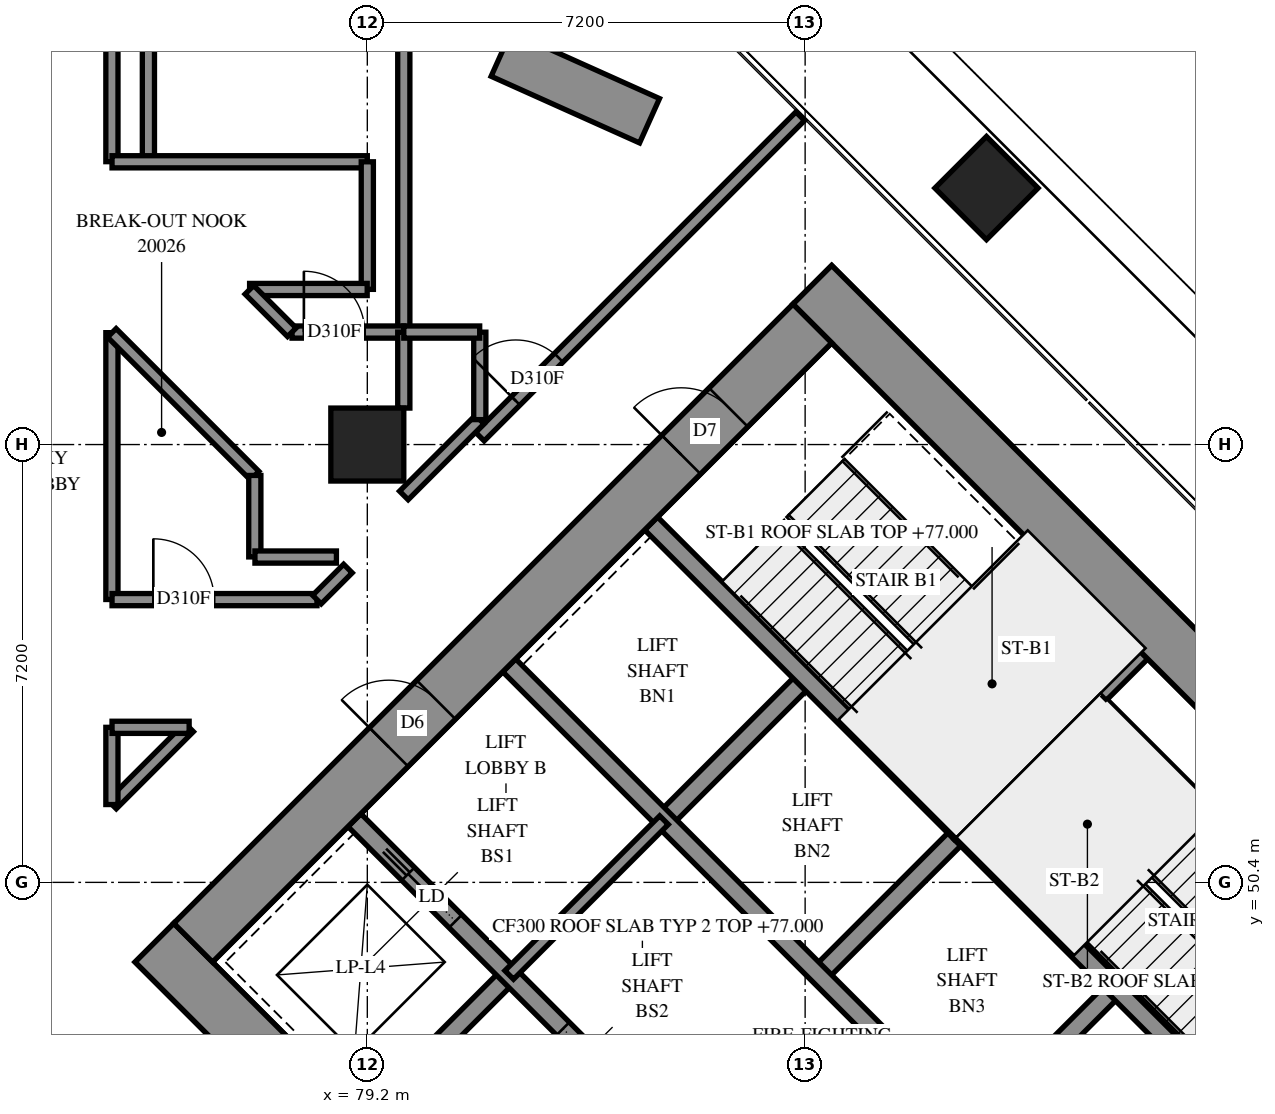
"""IFC4 building model, lengths in metres.
Left out: names, types, materials, properties, quantities, classifications, styles, units other than length and angle.
Written with IfcOpenShell. Run it as: python <this file> out.ifc"""

import sys

from ifc_helpers import new_model, si_unit, direction, frame, frame_2d, origin, origin_2d, place, context, subcontext, project, spatial, rectangle, extrude, element, fill, save


model = new_model("IFC4")
c1 = context("Model", 3, precision=1e-05, world=origin(), true_north=direction((0.0, 1.0)))
c2 = subcontext(c1, "Body", "Model", "MODEL_VIEW")
j1 = project(units=[si_unit("LENGTHUNIT", "METRE"), si_unit("PLANEANGLEUNIT", "RADIAN")], contexts=[c1])
p1 = place(None, origin())
s1 = spatial("IfcSite", under=j1, at=p1, CompositionType="ELEMENT")
p2 = place(p1, origin())
s2 = spatial("IfcBuilding", under=s1, at=p2, CompositionType="ELEMENT")
p3 = place(p2, frame((0.0, 0.0, 77.0)))
s3 = spatial("IfcBuildingStorey", under=s2, at=p3, CompositionType="ELEMENT", Elevation=77.0)
for number, where, z_axis, x_axis in (
    (1, (79.2, 57.6, 0.0), (0.0, 0.0, 1.0), (1.0, 0.0, 0.0)),
    (2, (89.382, 61.818, 0.0), (0.0, 0.0, 1.0), (0.707, -0.707, 0.0)),
):
    element("IfcColumn", number, at=place(p3, frame(where, z_axis=z_axis, x_axis=x_axis)), inside=s3, PredefinedType="COLUMN", context=c2, shape_type="SweptSolid", body=[
        extrude(rectangle(XDim=1.2, YDim=1.2, at=origin_2d()), origin(), (0.0, 0.0, 1.0), 3.9),
    ])
p4 = place(p3, frame((75.7, 49.408, -0.3), z_axis=(0.0, 0.0, 1.0), x_axis=(0.7071098676, -0.7071036948, 0.0)))
e3 = element("IfcWall", 3, at=p4, inside=s3, PredefinedType="SHEAR", context=c2, shape_type="SweptSolid", body=[
    extrude(rectangle(XDim=16.2, YDim=0.9, at=frame_2d((8.1, 0.0))), origin(), (0.0, 0.0, 1.0), 3.5),
])
p5 = place(p3, frame((86.519, 60.227, -0.3), z_axis=(0.0, 0.0, 1.0), x_axis=(0.7071036948, -0.7071098676, 0.0)))
e4 = element("IfcWall", 4, at=p5, inside=s3, PredefinedType="SHEAR", context=c2, shape_type="SweptSolid", body=[
    extrude(rectangle(XDim=16.2, YDim=0.9, at=frame_2d((8.1, 0.0))), origin(), (0.0, 0.0, 1.0), 3.5),
])
p6 = place(p5, frame((10.9, 0.0, 0.3)))
e5 = element("IfcOpeningElement", 5, at=p6, cuts=e4, PredefinedType="OPENING", context=c2, shape_type="SweptSolid", body=[
    extrude(rectangle(XDim=0.8, YDim=2.1, at=frame_2d((0.4, 1.05))), frame((0.0, 0.46, 0.0), z_axis=(0.0, -1.0, 0.0), x_axis=(1.0, 0.0, 0.0)), (0.0, 0.0, 1.0), 0.92),
])
p7 = place(p3, frame((76.336, 49.408, -0.3), z_axis=(0.0, 0.0, 1.0), x_axis=(0.7071067812, 0.7071067812, 0.0)))
e6 = element("IfcWall", 6, at=p7, inside=s3, PredefinedType="SHEAR", context=c2, shape_type="SweptSolid", body=[
    extrude(rectangle(XDim=14.4, YDim=0.9, at=frame_2d((7.2, 0.0))), origin(), (0.0, 0.0, 1.0), 3.5),
])
p8 = place(p7, frame((4.55, 0.0, 0.3)))
e7 = element("IfcOpeningElement", 7, at=p8, cuts=e6, PredefinedType="OPENING", context=c2, shape_type="SweptSolid", body=[
    extrude(rectangle(XDim=1.1, YDim=2.1, at=frame_2d((0.55, 1.05))), frame((0.0, 0.46, 0.0), z_axis=(0.0, -1.0, 0.0), x_axis=(1.0, 0.0, 0.0)), (0.0, 0.0, 1.0), 0.92),
])
p9 = place(p7, frame((11.35, 0.0, 0.3)))
e8 = element("IfcOpeningElement", 8, at=p9, cuts=e6, PredefinedType="OPENING", context=c2, shape_type="SweptSolid", body=[
    extrude(rectangle(XDim=1.1, YDim=2.1, at=frame_2d((0.55, 1.05))), frame((0.0, 0.46, 0.0), z_axis=(0.0, -1.0, 0.0), x_axis=(1.0, 0.0, 0.0)), (0.0, 0.0, 1.0), 0.92),
])
p10 = place(p3, frame((87.155, 38.589, -0.3), z_axis=(0.0, 0.0, 1.0), x_axis=(0.7071067812, 0.7071067812, 0.0)))
e9 = element("IfcWall", 9, at=p10, inside=s3, PredefinedType="SHEAR", context=c2, shape_type="SweptSolid", body=[
    extrude(rectangle(XDim=14.4, YDim=0.9, at=frame_2d((7.2, 0.0))), origin(), (0.0, 0.0, 1.0), 3.5),
])
p11 = place(p10, frame((4.55, 0.0, 0.3)))
e10 = element("IfcOpeningElement", 10, at=p11, cuts=e9, PredefinedType="OPENING", context=c2, shape_type="SweptSolid", body=[
    extrude(rectangle(XDim=1.1, YDim=2.1, at=frame_2d((0.55, 1.05))), frame((0.0, 0.46, 0.0), z_axis=(0.0, -1.0, 0.0), x_axis=(1.0, 0.0, 0.0)), (0.0, 0.0, 1.0), 0.92),
])
p12 = place(p10, frame((11.35, 0.0, 0.3)))
e11 = element("IfcOpeningElement", 11, at=p12, cuts=e9, PredefinedType="OPENING", context=c2, shape_type="SweptSolid", body=[
    extrude(rectangle(XDim=1.1, YDim=2.1, at=frame_2d((0.55, 1.05))), frame((0.0, 0.46, 0.0), z_axis=(0.0, -1.0, 0.0), x_axis=(1.0, 0.0, 0.0)), (0.0, 0.0, 1.0), 0.92),
])
for number, where, z_axis, x_axis in (
    (12, (79.2, 46.544, 0.0), (0.0, 0.0, 1.0), (0.707, 0.707, 0.0)),
    (13, (84.079, 51.423, 0.0), (0.0, 0.0, 1.0), (0.707, 0.707, 0.0)),
):
    element("IfcWall", number, at=place(p3, frame(where, z_axis=z_axis, x_axis=x_axis)), inside=s3, PredefinedType="SOLIDWALL", context=c2, shape_type="SweptSolid", body=[
        extrude(rectangle(XDim=3.3, YDim=0.3, at=frame_2d((1.65, 0.0))), origin(), (0.0, 0.0, 1.0), 3.9),
    ])
for number, where, z_axis, x_axis in (
    (14, (86.625, 48.878, 0.0), (0.0, 0.0, 1.0), (0.707, 0.707, 0.0)),
    (15, (89.17, 46.332, 0.0), (0.0, 0.0, 1.0), (0.707, 0.707, 0.0)),
):
    element("IfcWall", number, at=place(p3, frame(where, z_axis=z_axis, x_axis=x_axis)), inside=s3, PredefinedType="SOLIDWALL", context=c2, shape_type="SweptSolid", body=[
        extrude(rectangle(XDim=3.3, YDim=0.3, at=frame_2d((1.65, 0.0))), origin(), (0.0, 0.0, 1.0), 3.9),
    ])
p13 = place(p3, frame((78.988, 51.423, 0.0), z_axis=(0.0, 0.0, 1.0), x_axis=(0.7071067812, -0.7071067812, 0.0)))
e16 = element("IfcWall", 16, at=p13, inside=s3, PredefinedType="SOLIDWALL", context=c2, shape_type="SweptSolid", body=[
    extrude(rectangle(XDim=14.4, YDim=0.3, at=frame_2d((7.2, 0.0))), origin(), (0.0, 0.0, 1.0), 3.9),
])
p14 = place(p13, frame((1.25, 0.0, 0.0)))
e17 = element("IfcOpeningElement", 17, at=p14, cuts=e16, PredefinedType="OPENING", context=c2, shape_type="SweptSolid", body=[
    extrude(rectangle(XDim=1.1, YDim=2.1, at=frame_2d((0.55, 1.05))), frame((0.0, 0.16, 0.0), z_axis=(0.0, -1.0, 0.0), x_axis=(1.0, 0.0, 0.0)), (0.0, 0.0, 1.0), 0.32),
])
p15 = place(p13, frame((4.85, 0.0, 0.0)))
e18 = element("IfcOpeningElement", 18, at=p15, cuts=e16, PredefinedType="OPENING", context=c2, shape_type="SweptSolid", body=[
    extrude(rectangle(XDim=1.1, YDim=2.1, at=frame_2d((0.55, 1.05))), frame((0.0, 0.16, 0.0), z_axis=(0.0, -1.0, 0.0), x_axis=(1.0, 0.0, 0.0)), (0.0, 0.0, 1.0), 0.32),
])
p16 = place(p13, frame((8.45, 0.0, 0.0)))
e19 = element("IfcOpeningElement", 19, at=p16, cuts=e16, PredefinedType="OPENING", context=c2, shape_type="SweptSolid", body=[
    extrude(rectangle(XDim=1.1, YDim=2.1, at=frame_2d((0.55, 1.05))), frame((0.0, 0.16, 0.0), z_axis=(0.0, -1.0, 0.0), x_axis=(1.0, 0.0, 0.0)), (0.0, 0.0, 1.0), 0.32),
])
p17 = place(p13, frame((12.05, 0.0, 0.0)))
e20 = element("IfcOpeningElement", 20, at=p17, cuts=e16, PredefinedType="OPENING", context=c2, shape_type="SweptSolid", body=[
    extrude(rectangle(XDim=1.1, YDim=2.1, at=frame_2d((0.55, 1.05))), frame((0.0, 0.16, 0.0), z_axis=(0.0, -1.0, 0.0), x_axis=(1.0, 0.0, 0.0)), (0.0, 0.0, 1.0), 0.32),
])
p18 = place(p3, frame((81.534, 53.969, 0.0), z_axis=(0.0, 0.0, 1.0), x_axis=(0.707103309, -0.7071102534, 0.0)))
e21 = element("IfcWall", 21, at=p18, inside=s3, PredefinedType="SOLIDWALL", context=c2, shape_type="SweptSolid", body=[
    extrude(rectangle(XDim=14.4, YDim=0.3, at=frame_2d((7.2, 0.0))), origin(), (0.0, 0.0, 1.0), 3.9),
])
p19 = place(p18, frame((12.05, 0.0, 0.0)))
e22 = element("IfcOpeningElement", 22, at=p19, cuts=e21, PredefinedType="OPENING", context=c2, shape_type="SweptSolid", body=[
    extrude(rectangle(XDim=1.1, YDim=2.1, at=frame_2d((0.55, 1.05))), frame((0.0, 0.16, 0.0), z_axis=(0.0, -1.0, 0.0), x_axis=(1.0, 0.0, 0.0)), (0.0, 0.0, 1.0), 0.32),
])
for number, where, z_axis, x_axis in (
    (23, (83.867, 56.302, 0.0), (0.0, 0.0, 1.0), (0.707, -0.707, 0.0)),
    (24, (88.958, 51.211, 0.0), (0.0, 0.0, 1.0), (0.707, -0.707, 0.0)),
):
    element("IfcWall", number, at=place(p3, frame(where, z_axis=z_axis, x_axis=x_axis)), inside=s3, PredefinedType="SOLIDWALL", context=c2, shape_type="SweptSolid", body=[
        extrude(rectangle(XDim=7.2, YDim=0.3, at=frame_2d((3.6, 0.0))), origin(), (0.0, 0.0, 1.0), 3.9),
    ])
p20 = place(p3, frame((88.958, 51.211, 0.0), z_axis=(0.0, 0.0, 1.0), x_axis=(0.7071067812, 0.7071067812, 0.0)))
e25 = element("IfcWall", 25, at=p20, inside=s3, PredefinedType="SOLIDWALL", context=c2, shape_type="SweptSolid", body=[
    extrude(rectangle(XDim=4.2, YDim=0.3, at=frame_2d((2.1, 0.0))), origin(), (0.0, 0.0, 1.0), 3.9),
])
p21 = place(p3, frame((83.841, 62.925, 0.0), z_axis=(0.0, 0.0, 1.0), x_axis=(-0.9122966033, 0.4095301059, 0.0)))
e26 = element("IfcWall", 26, at=p21, inside=s3, PredefinedType="SOLIDWALL", context=c2, shape_type="SweptSolid", body=[
    extrude(rectangle(XDim=2.676, YDim=0.8, at=frame_2d((1.338, 0.0))), origin(), (0.0, 0.0, 1.0), 0.65),
])
p22 = place(p3, frame((91.313, 53.354, 0.0), z_axis=(0.0, 0.0, 1.0), x_axis=(0.7071067812, -0.7071067812, 0.0)))
e27 = element("IfcWall", 27, at=p22, inside=s3, PredefinedType="PARTITIONING", context=c2, shape_type="SweptSolid", body=[
    extrude(rectangle(XDim=5.95, YDim=0.15, at=frame_2d((2.975, 0.0))), origin(), (0.0, 0.0, 1.0), 3.9),
])
p23 = place(p3, frame((81.534, 48.878, 0.0), z_axis=(0.0, 0.0, 1.0), x_axis=(0.707092892, 0.7071206701, 0.0)))
e28 = element("IfcWall", 28, at=p23, inside=s3, PredefinedType="PARTITIONING", context=c2, shape_type="SweptSolid", body=[
    extrude(rectangle(XDim=3.6, YDim=0.2, at=frame_2d((1.8, 0.0))), origin(), (0.0, 0.0, 1.0), 3.9),
])
p24 = place(p3, frame((75.6, 62.25, 0.0), z_axis=(0.0, 0.0, 1.0), x_axis=(0.0, 1.0, 0.0)))
e29 = element("IfcWall", 29, at=p24, inside=s3, PredefinedType="PARTITIONING", context=c2, shape_type="SweptSolid", body=[
    extrude(rectangle(XDim=8.42, YDim=0.2, at=frame_2d((4.21, 0.0))), origin(), (0.0, 0.0, 1.0), 3.9),
])
p25 = place(p3, frame((81.051, 57.731, 0.0), z_axis=(0.0, 0.0, 1.0), x_axis=(0.7071067812, 0.7071067812, 0.0)))
e30 = element("IfcWall", 30, at=p25, inside=s3, PredefinedType="PARTITIONING", context=c2, shape_type="SweptSolid", body=[
    extrude(rectangle(XDim=7.45, YDim=0.2, at=frame_2d((3.725, 0.0))), origin(), (0.0, 0.0, 1.0), 3.9),
])
p26 = place(p25, frame((0.833, 0.0, 0.0)))
e31 = element("IfcOpeningElement", 31, at=p26, cuts=e30, PredefinedType="OPENING", context=c2, shape_type="SweptSolid", body=[
    extrude(rectangle(XDim=1.0, YDim=2.1, at=frame_2d((0.5, 1.05))), frame((0.0, 0.11, 0.0), z_axis=(0.0, -1.0, 0.0), x_axis=(1.0, 0.0, 0.0)), (0.0, 0.0, 1.0), 0.22),
])
p27 = place(p3, frame((75.0, 62.252, 0.0), z_axis=(0.0, 0.0, 1.0), x_axis=(0.0, 1.0, 0.0)))
e32 = element("IfcWall", 32, at=p27, inside=s3, PredefinedType="PARTITIONING", context=c2, shape_type="SweptSolid", body=[
    extrude(rectangle(XDim=5.548, YDim=0.2, at=frame_2d((2.774, 0.0))), origin(), (0.0, 0.0, 1.0), 3.9),
])
p28 = place(p3, frame((79.8, 59.45, 0.0), z_axis=(0.0, 0.0, 1.0), x_axis=(0.0, 1.0, 0.0)))
e33 = element("IfcWall", 33, at=p28, inside=s3, PredefinedType="PARTITIONING", context=c2, shape_type="SweptSolid", body=[
    extrude(rectangle(XDim=4.75, YDim=0.2, at=frame_2d((2.375, 0.0))), origin(), (0.0, 0.0, 1.0), 3.9),
])
p29 = place(p3, frame((75.0, 55.052, 0.0), z_axis=(0.0, 0.0, 1.0), x_axis=(0.0, 1.0, 0.0)))
e34 = element("IfcWall", 34, at=p29, inside=s3, PredefinedType="PARTITIONING", context=c2, shape_type="SweptSolid", body=[
    extrude(rectangle(XDim=4.388, YDim=0.2, at=frame_2d((2.194, 0.0))), origin(), (0.0, 0.0, 1.0), 3.9),
])
p30 = place(p3, frame((75.002, 62.25, 0.0), z_axis=(0.0, 0.0, 1.0), x_axis=(1.0, 0.0, 0.0)))
e35 = element("IfcWall", 35, at=p30, inside=s3, PredefinedType="PARTITIONING", context=c2, shape_type="SweptSolid", body=[
    extrude(rectangle(XDim=4.198, YDim=0.2, at=frame_2d((2.099, 0.0))), origin(), (0.0, 0.0, 1.0), 3.9),
])
p31 = place(p3, frame((75.002, 55.05, 0.0), z_axis=(0.0, 0.0, 1.0), x_axis=(1.0, 0.0, 0.0)))
e36 = element("IfcWall", 36, at=p31, inside=s3, PredefinedType="PARTITIONING", context=c2, shape_type="SweptSolid", body=[
    extrude(rectangle(XDim=3.37, YDim=0.2, at=frame_2d((1.685, 0.0))), origin(), (0.0, 0.0, 1.0), 3.9),
])
p32 = place(p31, frame((0.679, 0.0, 0.0)))
e37 = element("IfcOpeningElement", 37, at=p32, cuts=e36, PredefinedType="OPENING", context=c2, shape_type="SweptSolid", body=[
    extrude(rectangle(XDim=1.0, YDim=2.1, at=frame_2d((0.5, 1.05))), frame((0.0, 0.11, 0.0), z_axis=(0.0, -1.0, 0.0), x_axis=(1.0, 0.0, 0.0)), (0.0, 0.0, 1.0), 0.22),
])
p33 = place(p3, frame((74.999, 59.437, 0.0), z_axis=(0.0, 0.0, 1.0), x_axis=(0.7071067812, -0.7071067812, 0.0)))
e38 = element("IfcWall", 38, at=p33, inside=s3, PredefinedType="PARTITIONING", context=c2, shape_type="SweptSolid", body=[
    extrude(rectangle(XDim=3.321, YDim=0.2, at=frame_2d((1.66, 0.0))), origin(), (0.0, 0.0, 1.0), 3.9),
])
p34 = place(p3, frame((79.2, 60.152, 0.0), z_axis=(0.0, 0.0, 1.0), x_axis=(0.0, 1.0, 0.0)))
e39 = element("IfcWall", 39, at=p34, inside=s3, PredefinedType="PARTITIONING", context=c2, shape_type="SweptSolid", body=[
    extrude(rectangle(XDim=2.098, YDim=0.2, at=frame_2d((1.049, 0.0))), origin(), (0.0, 0.0, 1.0), 3.9),
])
p35 = place(p3, frame((77.264, 60.15, 0.0), z_axis=(0.0, 0.0, 1.0), x_axis=(1.0, 0.0, 0.0)))
e40 = element("IfcWall", 40, at=p35, inside=s3, PredefinedType="PARTITIONING", context=c2, shape_type="SweptSolid", body=[
    extrude(rectangle(XDim=1.934, YDim=0.2, at=frame_2d((0.967, 0.0))), origin(), (0.0, 0.0, 1.0), 3.9),
])
p36 = place(p3, frame((77.962, 59.45, 0.0), z_axis=(0.0, 0.0, 1.0), x_axis=(1.0, 0.0, 0.0)))
e41 = element("IfcWall", 41, at=p36, inside=s3, PredefinedType="PARTITIONING", context=c2, shape_type="SweptSolid", body=[
    extrude(rectangle(XDim=1.838, YDim=0.2, at=frame_2d((0.919, 0.0))), origin(), (0.0, 0.0, 1.0), 3.9),
])
p37 = place(p36, frame((0.195, 0.0, 0.0)))
e42 = element("IfcOpeningElement", 42, at=p37, cuts=e41, PredefinedType="OPENING", context=c2, shape_type="SweptSolid", body=[
    extrude(rectangle(XDim=1.0, YDim=2.1, at=frame_2d((0.5, 1.05))), frame((0.0, 0.11, 0.0), z_axis=(0.0, -1.0, 0.0), x_axis=(1.0, 0.0, 0.0)), (0.0, 0.0, 1.0), 0.22),
])
p38 = place(p3, frame((75.001, 51.681, 0.0), z_axis=(0.0, 0.0, 1.0), x_axis=(0.7071067812, 0.7071067812, 0.0)))
e43 = element("IfcWall", 43, at=p38, inside=s3, PredefinedType="PARTITIONING", context=c2, shape_type="SweptSolid", body=[
    extrude(rectangle(XDim=1.793, YDim=0.2, at=frame_2d((0.897, 0.0))), origin(), (0.0, 0.0, 1.0), 3.9),
])
p39 = place(p3, frame((79.801, 56.763, 0.0), z_axis=(0.0, 0.0, 1.0), x_axis=(0.7071067812, 0.7071067812, 0.0)))
e44 = element("IfcWall", 44, at=p39, inside=s3, PredefinedType="PARTITIONING", context=c2, shape_type="SweptSolid", body=[
    extrude(rectangle(XDim=1.765, YDim=0.2, at=frame_2d((0.882, 0.0))), origin(), (0.0, 0.0, 1.0), 3.9),
])
p40 = place(p3, frame((81.05, 58.01, 0.0), z_axis=(0.0, 0.0, 1.0), x_axis=(0.0, 1.0, 0.0)))
e45 = element("IfcWall", 45, at=p40, inside=s3, PredefinedType="PARTITIONING", context=c2, shape_type="SweptSolid", body=[
    extrude(rectangle(XDim=1.438, YDim=0.2, at=frame_2d((0.719, 0.0))), origin(), (0.0, 0.0, 1.0), 3.9),
])
for number, where, z_axis, x_axis in (
    (46, (77.35, 55.752, 0.0), (0.0, 0.0, 1.0), (0.0, 1.0, 0.0)),
    (47, (77.352, 55.75, 0.0), (0.0, 0.0, 1.0), (1.0, 0.0, 0.0)),
):
    element("IfcWall", number, at=place(p3, frame(where, z_axis=z_axis, x_axis=x_axis)), inside=s3, PredefinedType="PARTITIONING", context=c2, shape_type="SweptSolid", body=[
        extrude(rectangle(XDim=1.34, YDim=0.2, at=frame_2d((0.67, 0.0))), origin(), (0.0, 0.0, 1.0), 3.9),
    ])
p41 = place(p3, frame((75.0, 51.68, 0.0), z_axis=(0.0, 0.0, 1.0), x_axis=(0.0, 1.0, 0.0)))
e48 = element("IfcWall", 48, at=p41, inside=s3, PredefinedType="PARTITIONING", context=c2, shape_type="SweptSolid", body=[
    extrude(rectangle(XDim=1.27, YDim=0.2, at=frame_2d((0.635, 0.0))), origin(), (0.0, 0.0, 1.0), 3.9),
])
p42 = place(p3, frame((75.002, 52.95, 0.0), z_axis=(0.0, 0.0, 1.0), x_axis=(1.0, 0.0, 0.0)))
e49 = element("IfcWall", 49, at=p42, inside=s3, PredefinedType="PARTITIONING", context=c2, shape_type="SweptSolid", body=[
    extrude(rectangle(XDim=1.268, YDim=0.2, at=frame_2d((0.634, 0.0))), origin(), (0.0, 0.0, 1.0), 3.9),
])
p43 = place(p3, frame((79.8, 58.2, 0.0), z_axis=(0.0, 0.0, 1.0), x_axis=(0.0, 1.0, 0.0)))
e50 = element("IfcWall", 50, at=p43, inside=s3, PredefinedType="PARTITIONING", context=c2, shape_type="SweptSolid", body=[
    extrude(rectangle(XDim=1.25, YDim=0.2, at=frame_2d((0.625, 0.0))), origin(), (0.0, 0.0, 1.0), 3.9),
])
p44 = place(p3, frame((79.8, 59.45, 0.0), z_axis=(0.0, 0.0, 1.0), x_axis=(1.0, 0.0, 0.0)))
e51 = element("IfcWall", 51, at=p44, inside=s3, PredefinedType="PARTITIONING", context=c2, shape_type="SweptSolid", body=[
    extrude(rectangle(XDim=1.248, YDim=0.2, at=frame_2d((0.624, 0.0))), origin(), (0.0, 0.0, 1.0), 3.9),
])
p45 = place(p3, frame((77.26, 60.145, 0.0), z_axis=(0.0, 0.0, 1.0), x_axis=(0.7071067812, -0.7071067812, 0.0)))
e52 = element("IfcWall", 52, at=p45, inside=s3, PredefinedType="PARTITIONING", context=c2, shape_type="SweptSolid", body=[
    extrude(rectangle(XDim=0.987, YDim=0.2, at=frame_2d((0.493, 0.0))), origin(), (0.0, 0.0, 1.0), 3.9),
])
p46 = place(p3, frame((78.371, 55.051, 0.0), z_axis=(0.0, 0.0, 1.0), x_axis=(0.7071067812, 0.7071067812, 0.0)))
e53 = element("IfcWall", 53, at=p46, inside=s3, PredefinedType="PARTITIONING", context=c2, shape_type="SweptSolid", body=[
    extrude(rectangle(XDim=0.721, YDim=0.2, at=frame_2d((0.361, 0.0))), origin(), (0.0, 0.0, 1.0), 3.9),
])
p47 = place(p8, origin())
e54 = element("IfcDoor", 54, at=p47, inside=s3, OperationType="DOUBLE_DOOR_SINGLE_SWING", PredefinedType="DOOR", context=c2, shape_type="SweptSolid", body=[
    extrude(rectangle(XDim=1.1, YDim=2.1, at=frame_2d((0.55, 1.05))), frame((0.0, 0.025, 0.0), z_axis=(0.0, -1.0, 0.0), x_axis=(1.0, 0.0, 0.0)), (0.0, 0.0, 1.0), 0.05),
])
fill(e7, e54)
p48 = place(p9, origin())
e55 = element("IfcDoor", 55, at=p48, inside=s3, OperationType="SINGLE_SWING_LEFT", PredefinedType="DOOR", context=c2, shape_type="SweptSolid", body=[
    extrude(rectangle(XDim=1.1, YDim=2.1, at=frame_2d((0.55, 1.05))), frame((0.0, 0.025, 0.0), z_axis=(0.0, -1.0, 0.0), x_axis=(1.0, 0.0, 0.0)), (0.0, 0.0, 1.0), 0.05),
])
fill(e8, e55)
p49 = place(p14, origin())
e56 = element("IfcDoor", 56, at=p49, inside=s3, OperationType="SLIDING_TO_LEFT", PredefinedType="DOOR", context=c2, shape_type="SweptSolid", body=[
    extrude(rectangle(XDim=1.1, YDim=2.1, at=frame_2d((0.55, 1.05))), frame((0.0, 0.025, 0.0), z_axis=(0.0, -1.0, 0.0), x_axis=(1.0, 0.0, 0.0)), (0.0, 0.0, 1.0), 0.05),
])
fill(e17, e56)
p50 = place(p15, origin())
e57 = element("IfcDoor", 57, at=p50, inside=s3, OperationType="SLIDING_TO_RIGHT", PredefinedType="DOOR", context=c2, shape_type="SweptSolid", body=[
    extrude(rectangle(XDim=1.1, YDim=2.1, at=frame_2d((0.55, 1.05))), frame((0.0, 0.025, 0.0), z_axis=(0.0, -1.0, 0.0), x_axis=(1.0, 0.0, 0.0)), (0.0, 0.0, 1.0), 0.05),
])
fill(e18, e57)
p51 = place(p32, origin())
e58 = element("IfcDoor", 58, at=p51, inside=s3, OperationType="SINGLE_SWING_LEFT", PredefinedType="DOOR", context=c2, shape_type="SweptSolid", body=[
    extrude(rectangle(XDim=1.0, YDim=2.1, at=frame_2d((0.5, 1.05))), frame((0.0, 0.025, 0.0), z_axis=(0.0, -1.0, 0.0), x_axis=(1.0, 0.0, 0.0)), (0.0, 0.0, 1.0), 0.05),
])
fill(e37, e58)
p52 = place(p37, origin())
e59 = element("IfcDoor", 59, at=p52, inside=s3, OperationType="SINGLE_SWING_LEFT", PredefinedType="DOOR", context=c2, shape_type="SweptSolid", body=[
    extrude(rectangle(XDim=1.0, YDim=2.1, at=frame_2d((0.5, 1.05))), frame((0.0, 0.025, 0.0), z_axis=(0.0, -1.0, 0.0), x_axis=(1.0, 0.0, 0.0)), (0.0, 0.0, 1.0), 0.05),
])
fill(e42, e59)
p53 = place(p26, origin())
e60 = element("IfcDoor", 60, at=p53, inside=s3, OperationType="SINGLE_SWING_RIGHT", PredefinedType="DOOR", context=c2, shape_type="SweptSolid", body=[
    extrude(rectangle(XDim=1.0, YDim=2.1, at=frame_2d((0.5, 1.05))), frame((0.0, 0.025, 0.0), z_axis=(0.0, -1.0, 0.0), x_axis=(1.0, 0.0, 0.0)), (0.0, 0.0, 1.0), 0.05),
])
fill(e31, e60)
save(model, sys.argv[1])
